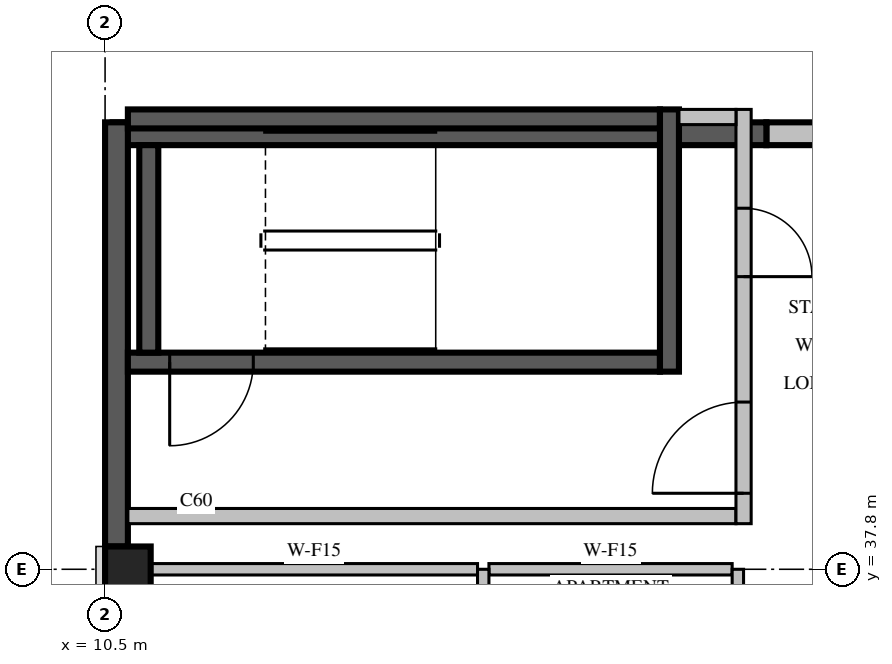
"""IFC4 building model, lengths in metres.
Left out: names, types, materials, properties, quantities, classifications, styles, units other than length and angle.
Written with IfcOpenShell. Run it as: python <this file> out.ifc"""

import sys

from ifc_helpers import new_model, si_unit, direction, frame, frame_2d, origin, origin_2d, place, context, subcontext, project, spatial, rectangle, extrude, source, transform, mapped, element, fill, save


model = new_model("IFC4")
c1 = context("Model", 3, precision=1e-05, world=origin(), true_north=direction((0.0, 1.0)))
c2 = subcontext(c1, "Body", "Model", "MODEL_VIEW")
j1 = project(units=[si_unit("LENGTHUNIT", "METRE"), si_unit("PLANEANGLEUNIT", "RADIAN")], contexts=[c1])
p1 = place(None, origin())
s1 = spatial("IfcSite", under=j1, at=p1, CompositionType="ELEMENT")
p2 = place(p1, origin())
s2 = spatial("IfcBuilding", under=s1, at=p2, CompositionType="ELEMENT")
p3 = place(p2, frame((0.0, 0.0, 358.0)))
s3 = spatial("IfcBuildingStorey", under=s2, at=p3, CompositionType="ELEMENT", Elevation=358.0)
m1 = source(origin(), c2, "Body", "SweptSolid", [
    extrude(rectangle(XDim=0.6, YDim=0.6, at=origin_2d()), origin(), (0.0, 0.0, 1.0), 3.5),
])
p4 = place(p3, frame((10.8, 37.8, 0.0), z_axis=(0.0, 0.0, 1.0), x_axis=(1.0, 0.0, 0.0)))
e1 = element("IfcColumn", 1, at=p4, inside=s3, PredefinedType="COLUMN", context=c2, shape_type="MappedRepresentation", body=[
    mapped(m1, transform((0.0, 0.0, 0.0), scale=1.0)),
])
m2 = source(origin(), c2, "Body", "SweptSolid", [
    extrude(rectangle(XDim=1.8, YDim=0.3, at=frame_2d((0.9, 0.0))), origin(), (0.0, 0.0, 1.0), 3.1),
])
p5 = place(p3, frame((21.0, 43.53, 0.0), z_axis=(0.0, 0.0, 1.0), x_axis=(-1.0, 0.0, 0.0)))
e2 = element("IfcWall", 2, at=p5, inside=s3, PredefinedType="STANDARD", context=c2, shape_type="MappedRepresentation", body=[
    mapped(m2, transform((0.0, 0.0, 0.0), scale=1.0)),
])
m3 = source(origin(), c2, "Body", "SweptSolid", [
    extrude(rectangle(XDim=8.6, YDim=0.3, at=frame_2d((4.3, 0.0))), origin(), (0.0, 0.0, 1.0), 3.1),
])
p6 = place(p3, frame((19.2, 43.53, 0.0), z_axis=(0.0, 0.0, 1.0), x_axis=(-1.0, 0.0, 0.0)))
e3 = element("IfcWall", 3, at=p6, inside=s3, PredefinedType="SOLIDWALL", context=c2, shape_type="MappedRepresentation", body=[
    mapped(m3, transform((0.0, 0.0, 0.0), scale=1.0)),
])
m4 = source(origin(), c2, "Body", "SweptSolid", [
    extrude(rectangle(XDim=5.58, YDim=0.3, at=frame_2d((2.79, 0.0))), origin(), (0.0, 0.0, 1.0), 3.1),
])
p7 = place(p3, frame((10.65, 43.68, 0.0), z_axis=(0.0, 0.0, 1.0), x_axis=(0.0, -1.0, 0.0)))
e4 = element("IfcWall", 4, at=p7, inside=s3, PredefinedType="SOLIDWALL", context=c2, shape_type="MappedRepresentation", body=[
    mapped(m4, transform((0.0, 0.0, 0.0), scale=1.0)),
])
m5 = source(origin(), c2, "Body", "SweptSolid", [
    extrude(rectangle(XDim=7.0, YDim=0.25, at=frame_2d((3.5, 0.0))), origin(), (0.0, 0.0, 1.0), 3.1),
])
p8 = place(p3, frame((10.8, 40.525, 0.0), z_axis=(0.0, 0.0, 1.0), x_axis=(1.0, 0.0, 0.0)))
e5 = element("IfcWall", 5, at=p8, inside=s3, PredefinedType="SOLIDWALL", context=c2, shape_type="MappedRepresentation", body=[
    mapped(m5, transform((0.0, 0.0, 0.0), scale=1.0)),
])
m6 = source(origin(), c2, "Body", "SweptSolid", [
    extrude(rectangle(XDim=1.1, YDim=2.1, at=frame_2d((0.55, 1.05))), frame((0.0, 0.135, 0.0), z_axis=(0.0, -1.0, 0.0), x_axis=(1.0, 0.0, 0.0)), (0.0, 0.0, 1.0), 0.27),
])
p9 = place(p8, frame((0.55, 0.0, 0.0)))
e6 = element("IfcOpeningElement", 6, at=p9, cuts=e5, PredefinedType="OPENING", context=c2, shape_type="MappedRepresentation", body=[
    mapped(m6, transform((0.0, 0.0, 0.0), scale=1.0)),
])
p10 = place(p3, frame((10.8, 43.725, 0.0), z_axis=(0.0, 0.0, 1.0), x_axis=(1.0, 0.0, 0.0)))
e7 = element("IfcWall", 7, at=p10, inside=s3, PredefinedType="SOLIDWALL", context=c2, shape_type="MappedRepresentation", body=[
    mapped(m5, transform((0.0, 0.0, 0.0), scale=1.0)),
])
m7 = source(origin(), c2, "Body", "SweptSolid", [
    extrude(rectangle(XDim=3.45, YDim=0.25, at=frame_2d((1.725, 0.0))), origin(), (0.0, 0.0, 1.0), 3.1),
])
p11 = place(p3, frame((17.925, 40.4, 0.0), z_axis=(0.0, 0.0, 1.0), x_axis=(0.0, 1.0, 0.0)))
e8 = element("IfcWall", 8, at=p11, inside=s3, PredefinedType="SOLIDWALL", context=c2, shape_type="MappedRepresentation", body=[
    mapped(m7, transform((0.0, 0.0, 0.0), scale=1.0)),
])
m8 = source(origin(), c2, "Body", "SweptSolid", [
    extrude(rectangle(XDim=2.73, YDim=0.25, at=frame_2d((1.365, 0.0))), origin(), (0.0, 0.0, 1.0), 3.1),
])
p12 = place(p3, frame((11.075, 40.65, 0.0), z_axis=(0.0, 0.0, 1.0), x_axis=(0.0, 1.0, 0.0)))
e9 = element("IfcWall", 9, at=p12, inside=s3, PredefinedType="SOLIDWALL", context=c2, shape_type="MappedRepresentation", body=[
    mapped(m8, transform((0.0, 0.0, 0.0), scale=1.0)),
])
m9 = source(origin(), c2, "Body", "SweptSolid", [
    extrude(rectangle(XDim=8.0, YDim=0.2, at=frame_2d((4.0, 0.0))), origin(), (0.0, 0.0, 1.0), 3.1),
])
p13 = place(p3, frame((10.8, 38.5, 0.0), z_axis=(0.0, 0.0, 1.0), x_axis=(1.0, 0.0, 0.0)))
e10 = element("IfcWall", 10, at=p13, inside=s3, PredefinedType="PARTITIONING", context=c2, shape_type="MappedRepresentation", body=[
    mapped(m9, transform((0.0, 0.0, 0.0), scale=1.0)),
])
m10 = source(origin(), c2, "Body", "SweptSolid", [
    extrude(rectangle(XDim=5.45, YDim=0.2, at=frame_2d((2.725, 0.0))), origin(), (0.0, 0.0, 1.0), 3.1),
])
p14 = place(p3, frame((18.9, 38.4, 0.0), z_axis=(0.0, 0.0, 1.0), x_axis=(0.0, 1.0, 0.0)))
e11 = element("IfcWall", 11, at=p14, inside=s3, PredefinedType="PARTITIONING", context=c2, shape_type="MappedRepresentation", body=[
    mapped(m10, transform((0.0, 0.0, 0.0), scale=1.0)),
])
m11 = source(origin(), c2, "Body", "SweptSolid", [
    extrude(rectangle(XDim=1.2, YDim=2.1, at=frame_2d((0.6, 1.05))), frame((0.0, 0.11, 0.0), z_axis=(0.0, -1.0, 0.0), x_axis=(1.0, 0.0, 0.0)), (0.0, 0.0, 1.0), 0.22),
])
p15 = place(p14, frame((0.4, 0.0, 0.0)))
e12 = element("IfcOpeningElement", 12, at=p15, cuts=e11, PredefinedType="OPENING", context=c2, shape_type="MappedRepresentation", body=[
    mapped(m11, transform((0.0, 0.0, 0.0), scale=1.0)),
])
m12 = source(origin(), c2, "Body", "SweptSolid", [
    extrude(rectangle(XDim=0.9, YDim=2.1, at=frame_2d((0.45, 1.05))), frame((0.0, 0.11, 0.0), z_axis=(0.0, -1.0, 0.0), x_axis=(1.0, 0.0, 0.0)), (0.0, 0.0, 1.0), 0.22),
])
p16 = place(p14, frame((3.25, 0.0, 0.0)))
e13 = element("IfcOpeningElement", 13, at=p16, cuts=e11, PredefinedType="OPENING", context=c2, shape_type="MappedRepresentation", body=[
    mapped(m12, transform((0.0, 0.0, 0.0), scale=1.0)),
])
m13 = source(origin(), c2, "Body", "SweptSolid", [
    extrude(rectangle(XDim=0.75, YDim=0.2, at=frame_2d((0.375, 0.0))), origin(), (0.0, 0.0, 1.0), 3.1),
])
p17 = place(p3, frame((18.05, 43.75, 0.0), z_axis=(0.0, 0.0, 1.0), x_axis=(1.0, 0.0, 0.0)))
e14 = element("IfcWall", 14, at=p17, inside=s3, PredefinedType="PARTITIONING", context=c2, shape_type="MappedRepresentation", body=[
    mapped(m13, transform((0.0, 0.0, 0.0), scale=1.0)),
])
m14 = source(origin(), c2, "Body", "SweptSolid", [
    extrude(rectangle(XDim=4.301, YDim=0.15, at=frame_2d((2.151, 0.0))), origin(), (0.0, 0.0, 1.0), 3.1),
])
p18 = place(p3, frame((15.4, 37.8, 0.0), z_axis=(0.0, 0.0, 1.0), x_axis=(-1.0, 0.0, 0.0)))
e15 = element("IfcWall", 15, at=p18, inside=s3, PredefinedType="PARTITIONING", context=c2, shape_type="MappedRepresentation", body=[
    mapped(m14, transform((0.0, 0.0, 0.0), scale=1.0)),
])
m15 = source(origin(), c2, "Body", "SweptSolid", [
    extrude(rectangle(XDim=3.2, YDim=0.15, at=frame_2d((1.6, 0.0))), origin(), (0.0, 0.0, 1.0), 3.1),
])
p19 = place(p3, frame((18.75, 37.8, 0.0), z_axis=(0.0, 0.0, 1.0), x_axis=(-1.0, 0.0, 0.0)))
e16 = element("IfcWall", 16, at=p19, inside=s3, PredefinedType="PARTITIONING", context=c2, shape_type="MappedRepresentation", body=[
    mapped(m15, transform((0.0, 0.0, 0.0), scale=1.0)),
])
m16 = source(origin(), c2, "Body", "SweptSolid", [
    extrude(rectangle(XDim=8.4, YDim=0.15, at=frame_2d((4.2, 0.0))), origin(), (0.0, 0.0, 1.0), 3.1),
])
p20 = place(p3, frame((15.475, 29.4, 0.0), z_axis=(0.0, 0.0, 1.0), x_axis=(0.0, 1.0, 0.0)))
e17 = element("IfcWall", 17, at=p20, inside=s3, PredefinedType="PARTITIONING", context=c2, shape_type="MappedRepresentation", body=[
    mapped(m16, transform((0.0, 0.0, 0.0), scale=1.0)),
])
m17 = source(origin(), c2, "Body", "SweptSolid", [
    extrude(rectangle(XDim=1.0, YDim=2.1, at=frame_2d((0.5, 1.05))), frame((0.0, 0.085, 0.0), z_axis=(0.0, -1.0, 0.0), x_axis=(1.0, 0.0, 0.0)), (0.0, 0.0, 1.0), 0.17),
])
p21 = place(p20, frame((3.068, 0.0, 0.0)))
e18 = element("IfcOpeningElement", 18, at=p21, cuts=e17, PredefinedType="OPENING", context=c2, shape_type="MappedRepresentation", body=[
    mapped(m17, transform((0.0, 0.0, 0.0), scale=1.0)),
])
m18 = source(origin(), c2, "Body", "SweptSolid", [
    extrude(rectangle(XDim=0.9, YDim=2.1, at=frame_2d((0.45, 1.05))), frame((0.0, 0.085, 0.0), z_axis=(0.0, -1.0, 0.0), x_axis=(1.0, 0.0, 0.0)), (0.0, 0.0, 1.0), 0.17),
])
p22 = place(p20, frame((1.067, 0.0, 0.0)))
e19 = element("IfcOpeningElement", 19, at=p22, cuts=e17, PredefinedType="OPENING", context=c2, shape_type="MappedRepresentation", body=[
    mapped(m18, transform((0.0, 0.0, 0.0), scale=1.0)),
])
p23 = place(p20, frame((7.252, 0.0, 0.0)))
e20 = element("IfcOpeningElement", 20, at=p23, cuts=e17, PredefinedType="OPENING", context=c2, shape_type="MappedRepresentation", body=[
    mapped(m18, transform((0.0, 0.0, 0.0), scale=1.0)),
])
p24 = place(p3, frame((18.825, 29.4, 0.0), z_axis=(0.0, 0.0, 1.0), x_axis=(0.0, 1.0, 0.0)))
e21 = element("IfcWall", 21, at=p24, inside=s3, PredefinedType="PARTITIONING", context=c2, shape_type="MappedRepresentation", body=[
    mapped(m16, transform((0.0, 0.0, 0.0), scale=1.0)),
])
p25 = place(p24, frame((3.467, 0.0, 0.0)))
e22 = element("IfcOpeningElement", 22, at=p25, cuts=e21, PredefinedType="OPENING", context=c2, shape_type="MappedRepresentation", body=[
    mapped(m17, transform((0.0, 0.0, 0.0), scale=1.0)),
])
m19 = source(origin(), c2, "Body", "SweptSolid", [
    extrude(rectangle(XDim=1.1, YDim=2.1, at=frame_2d((0.55, 1.05))), frame((0.0, 0.025, 0.0), z_axis=(0.0, -1.0, 0.0), x_axis=(1.0, 0.0, 0.0)), (0.0, 0.0, 1.0), 0.05),
])
p26 = place(p9, origin())
e23 = element("IfcDoor", 23, at=p26, inside=s3, OperationType="SINGLE_SWING_RIGHT", PredefinedType="DOOR", context=c2, shape_type="MappedRepresentation", body=[
    mapped(m19, transform((0.0, 0.0, 0.0), scale=1.0)),
])
fill(e6, e23)
m20 = source(origin(), c2, "Body", "SweptSolid", [
    extrude(rectangle(XDim=1.2, YDim=2.1, at=frame_2d((0.6, 1.05))), frame((0.0, 0.025, 0.0), z_axis=(0.0, -1.0, 0.0), x_axis=(1.0, 0.0, 0.0)), (0.0, 0.0, 1.0), 0.05),
])
p27 = place(p15, origin())
e24 = element("IfcDoor", 24, at=p27, inside=s3, OperationType="SINGLE_SWING_LEFT", PredefinedType="DOOR", context=c2, shape_type="MappedRepresentation", body=[
    mapped(m20, transform((0.0, 0.0, 0.0), scale=1.0)),
])
fill(e12, e24)
m21 = source(origin(), c2, "Body", "SweptSolid", [
    extrude(rectangle(XDim=0.9, YDim=2.1, at=frame_2d((0.45, 1.05))), frame((0.0, 0.025, 0.0), z_axis=(0.0, -1.0, 0.0), x_axis=(1.0, 0.0, 0.0)), (0.0, 0.0, 1.0), 0.05),
])
p28 = place(p16, origin())
e25 = element("IfcDoor", 25, at=p28, inside=s3, OperationType="SINGLE_SWING_RIGHT", PredefinedType="DOOR", context=c2, shape_type="MappedRepresentation", body=[
    mapped(m21, transform((0.0, 0.0, 0.0), scale=1.0)),
])
fill(e13, e25)
save(model, sys.argv[1])
